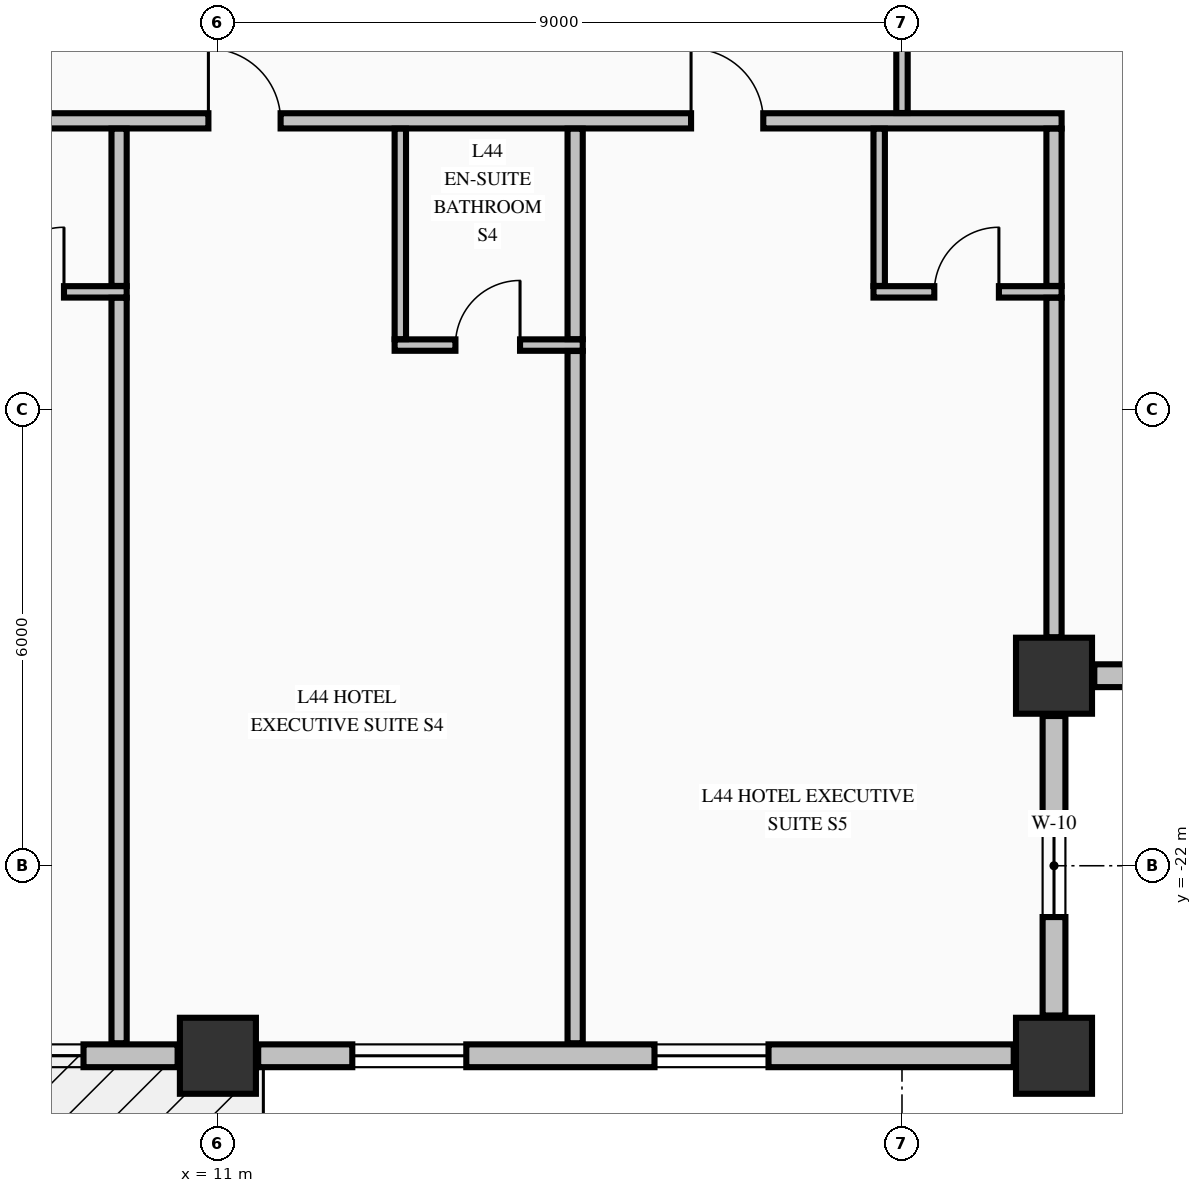
"""IFC4 building model, lengths in metres.
Left out: names, types, materials, properties, quantities, classifications, styles, units other than length and angle.
Written with IfcOpenShell. Run it as: python <this file> out.ifc"""

import sys

from ifc_helpers import new_model, si_unit, direction, frame, frame_2d, origin, origin_2d, place, context, subcontext, project, spatial, rectangle, extrude, element, fill, save


model = new_model("IFC4")
c1 = context("Model", 3, precision=1e-05, world=origin(), true_north=direction((0.0, 1.0)))
c2 = subcontext(c1, "Body", "Model", "MODEL_VIEW")
j1 = project(units=[si_unit("LENGTHUNIT", "METRE"), si_unit("PLANEANGLEUNIT", "RADIAN")], contexts=[c1])
p1 = place(None, origin())
s1 = spatial("IfcSite", under=j1, at=p1, CompositionType="ELEMENT")
p2 = place(p1, origin())
s2 = spatial("IfcBuilding", under=s1, at=p2, CompositionType="ELEMENT")
p3 = place(p2, frame((0.0, 0.0, 172.86)))
s3 = spatial("IfcBuildingStorey", under=s2, at=p3, CompositionType="ELEMENT", Elevation=172.86)
for number, where, z_axis, x_axis in (
    (1, (11.0, -24.5, -0.25), (0.0, 0.0, 1.0), (1.0, 0.0, 0.0)),
    (2, (22.0, -24.5, -0.25), (0.0, 0.0, 1.0), (1.0, 0.0, 0.0)),
    (3, (22.0, -19.5, -0.25), (0.0, 0.0, 1.0), (1.0, 0.0, 0.0)),
):
    element("IfcColumn", number, at=place(p3, frame(where, z_axis=z_axis, x_axis=x_axis)), inside=s3, PredefinedType="COLUMN", context=c2, shape_type="SweptSolid", body=[
        extrude(rectangle(XDim=1.0, YDim=1.0, at=origin_2d()), origin(), (0.0, 0.0, 1.0), 3.375),
    ])
p4 = place(p3, frame((22.0, -23.97, 0.0), z_axis=(0.0, 0.0, 1.0), x_axis=(0.0, 1.0, 0.0)))
e4 = element("IfcWall", 4, at=p4, inside=s3, PredefinedType="STANDARD", context=c2, shape_type="SweptSolid", body=[
    extrude(rectangle(XDim=3.94, YDim=0.3, at=frame_2d((1.97, 0.0))), origin(), (0.0, 0.0, 1.0), 2.517),
])
p5 = place(p4, frame((1.295, 0.0, 0.68)))
e5 = element("IfcOpeningElement", 5, at=p5, cuts=e4, PredefinedType="OPENING", context=c2, shape_type="SweptSolid", body=[
    extrude(rectangle(XDim=1.35, YDim=1.42, at=frame_2d((0.675, 0.71))), frame((0.0, 0.16, 0.0), z_axis=(0.0, -1.0, 0.0), x_axis=(1.0, 0.0, 0.0)), (0.0, 0.0, 1.0), 0.32),
])
p6 = place(p3, frame((22.53, -19.5, 0.0), z_axis=(0.0, 0.0, 1.0), x_axis=(1.0, 0.0, 0.0)))
e6 = element("IfcWall", 6, at=p6, inside=s3, PredefinedType="STANDARD", context=c2, shape_type="SweptSolid", body=[
    extrude(rectangle(XDim=3.94, YDim=0.3, at=frame_2d((1.97, 0.0))), origin(), (0.0, 0.0, 1.0), 2.517),
])
p7 = place(p6, frame((1.295, 0.0, 0.68)))
e7 = element("IfcOpeningElement", 7, at=p7, cuts=e6, PredefinedType="OPENING", context=c2, shape_type="SweptSolid", body=[
    extrude(rectangle(XDim=1.35, YDim=1.42, at=frame_2d((0.675, 0.71))), frame((0.0, 0.16, 0.0), z_axis=(0.0, -1.0, 0.0), x_axis=(1.0, 0.0, 0.0)), (0.0, 0.0, 1.0), 0.32),
])
p8 = place(p3, frame((0.53, -24.5, 0.0), z_axis=(0.0, 0.0, 1.0), x_axis=(1.0, 0.0, 0.0)))
e8 = element("IfcWall", 8, at=p8, inside=s3, PredefinedType="STANDARD", context=c2, shape_type="SweptSolid", body=[
    extrude(rectangle(XDim=9.94, YDim=0.3, at=frame_2d((4.97, 0.0))), origin(), (0.0, 0.0, 1.0), 2.517),
])
p9 = place(p8, frame((3.226, 0.0, 0.72)))
e9 = element("IfcOpeningElement", 9, at=p9, cuts=e8, PredefinedType="OPENING", context=c2, shape_type="SweptSolid", body=[
    extrude(rectangle(XDim=1.5, YDim=1.6, at=frame_2d((0.75, 0.8))), frame((0.0, 0.16, 0.0), z_axis=(0.0, -1.0, 0.0), x_axis=(1.0, 0.0, 0.0)), (0.0, 0.0, 1.0), 0.32),
])
p10 = place(p8, frame((5.214, 0.0, 0.72)))
e10 = element("IfcOpeningElement", 10, at=p10, cuts=e8, PredefinedType="OPENING", context=c2, shape_type="SweptSolid", body=[
    extrude(rectangle(XDim=1.5, YDim=1.6, at=frame_2d((0.75, 0.8))), frame((0.0, 0.16, 0.0), z_axis=(0.0, -1.0, 0.0), x_axis=(1.0, 0.0, 0.0)), (0.0, 0.0, 1.0), 0.32),
])
p11 = place(p8, frame((7.202, 0.0, 0.72)))
e11 = element("IfcOpeningElement", 11, at=p11, cuts=e8, PredefinedType="OPENING", context=c2, shape_type="SweptSolid", body=[
    extrude(rectangle(XDim=1.5, YDim=1.6, at=frame_2d((0.75, 0.8))), frame((0.0, 0.16, 0.0), z_axis=(0.0, -1.0, 0.0), x_axis=(1.0, 0.0, 0.0)), (0.0, 0.0, 1.0), 0.32),
])
p12 = place(p3, frame((11.53, -24.5, 0.0), z_axis=(0.0, 0.0, 1.0), x_axis=(1.0, 0.0, 0.0)))
e12 = element("IfcWall", 12, at=p12, inside=s3, PredefinedType="STANDARD", context=c2, shape_type="SweptSolid", body=[
    extrude(rectangle(XDim=9.94, YDim=0.3, at=frame_2d((4.97, 0.0))), origin(), (0.0, 0.0, 1.0), 2.517),
])
p13 = place(p12, frame((1.238, 0.0, 0.72)))
e13 = element("IfcOpeningElement", 13, at=p13, cuts=e12, PredefinedType="OPENING", context=c2, shape_type="SweptSolid", body=[
    extrude(rectangle(XDim=1.5, YDim=1.6, at=frame_2d((0.75, 0.8))), frame((0.0, 0.16, 0.0), z_axis=(0.0, -1.0, 0.0), x_axis=(1.0, 0.0, 0.0)), (0.0, 0.0, 1.0), 0.32),
])
p14 = place(p12, frame((5.214, 0.0, 0.72)))
e14 = element("IfcOpeningElement", 14, at=p14, cuts=e12, PredefinedType="OPENING", context=c2, shape_type="SweptSolid", body=[
    extrude(rectangle(XDim=1.5, YDim=1.6, at=frame_2d((0.75, 0.8))), frame((0.0, 0.16, 0.0), z_axis=(0.0, -1.0, 0.0), x_axis=(1.0, 0.0, 0.0)), (0.0, 0.0, 1.0), 0.32),
])
p15 = place(p3, frame((13.325, -15.15, 0.0), z_axis=(0.0, 0.0, 1.0), x_axis=(1.0, 0.0, 0.0)))
e15 = element("IfcWall", 15, at=p15, inside=s3, PredefinedType="PARTITIONING", context=c2, shape_type="SweptSolid", body=[
    extrude(rectangle(XDim=2.475, YDim=0.15, at=frame_2d((1.238, 0.0))), origin(), (0.0, 0.0, 1.0), 3.125),
])
p16 = place(p15, frame((0.8, 0.0, 0.0)))
e16 = element("IfcOpeningElement", 16, at=p16, cuts=e15, PredefinedType="OPENING", context=c2, shape_type="SweptSolid", body=[
    extrude(rectangle(XDim=0.85, YDim=2.1, at=frame_2d((0.425, 1.05))), frame((0.0, 0.085, 0.0), z_axis=(0.0, -1.0, 0.0), x_axis=(1.0, 0.0, 0.0)), (0.0, 0.0, 1.0), 0.17),
])
p17 = place(p3, frame((7.325, -14.45, 0.0), z_axis=(0.0, 0.0, 1.0), x_axis=(1.0, 0.0, 0.0)))
e17 = element("IfcWall", 17, at=p17, inside=s3, PredefinedType="PARTITIONING", context=c2, shape_type="SweptSolid", body=[
    extrude(rectangle(XDim=2.475, YDim=0.15, at=frame_2d((1.238, 0.0))), origin(), (0.0, 0.0, 1.0), 2.665),
])
p18 = place(p17, frame((0.8, 0.0, 0.0)))
e18 = element("IfcOpeningElement", 18, at=p18, cuts=e17, PredefinedType="OPENING", context=c2, shape_type="SweptSolid", body=[
    extrude(rectangle(XDim=0.85, YDim=2.1, at=frame_2d((0.425, 1.05))), frame((0.0, 0.085, 0.0), z_axis=(0.0, -1.0, 0.0), x_axis=(1.0, 0.0, 0.0)), (0.0, 0.0, 1.0), 0.17),
])
p19 = place(p3, frame((19.625, -14.45, 0.0), z_axis=(0.0, 0.0, 1.0), x_axis=(1.0, 0.0, 0.0)))
e19 = element("IfcWall", 19, at=p19, inside=s3, PredefinedType="PARTITIONING", context=c2, shape_type="SweptSolid", body=[
    extrude(rectangle(XDim=2.475, YDim=0.15, at=frame_2d((1.238, 0.0))), origin(), (0.0, 0.0, 1.0), 3.125),
])
p20 = place(p19, frame((0.8, 0.0, 0.0)))
e20 = element("IfcOpeningElement", 20, at=p20, cuts=e19, PredefinedType="OPENING", context=c2, shape_type="SweptSolid", body=[
    extrude(rectangle(XDim=0.85, YDim=2.1, at=frame_2d((0.425, 1.05))), frame((0.0, 0.085, 0.0), z_axis=(0.0, -1.0, 0.0), x_axis=(1.0, 0.0, 0.0)), (0.0, 0.0, 1.0), 0.17),
])
p21 = place(p3, frame((-17.1, -12.2, 0.0), z_axis=(0.0, 0.0, 1.0), x_axis=(1.0, 0.0, 0.0)))
e21 = element("IfcWall", 21, at=p21, inside=s3, PredefinedType="PARTITIONING", context=c2, shape_type="SweptSolid", body=[
    extrude(rectangle(XDim=39.2, YDim=0.2, at=frame_2d((19.6, 0.0))), origin(), (0.0, 0.0, 1.0), 3.125),
])
p22 = place(p21, frame((3.825, 0.0, 0.0)))
e22 = element("IfcOpeningElement", 22, at=p22, cuts=e21, PredefinedType="OPENING", context=c2, shape_type="SweptSolid", body=[
    extrude(rectangle(XDim=0.95, YDim=2.15, at=frame_2d((0.475, 1.075))), frame((0.0, 0.11, 0.0), z_axis=(0.0, -1.0, 0.0), x_axis=(1.0, 0.0, 0.0)), (0.0, 0.0, 1.0), 0.22),
])
p23 = place(p21, frame((13.775, 0.0, 0.0)))
e23 = element("IfcOpeningElement", 23, at=p23, cuts=e21, PredefinedType="OPENING", context=c2, shape_type="SweptSolid", body=[
    extrude(rectangle(XDim=0.95, YDim=2.15, at=frame_2d((0.475, 1.075))), frame((0.0, 0.11, 0.0), z_axis=(0.0, -1.0, 0.0), x_axis=(1.0, 0.0, 0.0)), (0.0, 0.0, 1.0), 0.22),
])
p24 = place(p21, frame((21.775, 0.0, 0.0)))
e24 = element("IfcOpeningElement", 24, at=p24, cuts=e21, PredefinedType="OPENING", context=c2, shape_type="SweptSolid", body=[
    extrude(rectangle(XDim=0.95, YDim=2.15, at=frame_2d((0.475, 1.075))), frame((0.0, 0.11, 0.0), z_axis=(0.0, -1.0, 0.0), x_axis=(1.0, 0.0, 0.0)), (0.0, 0.0, 1.0), 0.22),
])
p25 = place(p21, frame((27.975, 0.0, 0.0)))
e25 = element("IfcOpeningElement", 25, at=p25, cuts=e21, PredefinedType="OPENING", context=c2, shape_type="SweptSolid", body=[
    extrude(rectangle(XDim=0.95, YDim=2.15, at=frame_2d((0.475, 1.075))), frame((0.0, 0.11, 0.0), z_axis=(0.0, -1.0, 0.0), x_axis=(1.0, 0.0, 0.0)), (0.0, 0.0, 1.0), 0.22),
])
p26 = place(p21, frame((34.325, 0.0, 0.0)))
e26 = element("IfcOpeningElement", 26, at=p26, cuts=e21, PredefinedType="OPENING", context=c2, shape_type="SweptSolid", body=[
    extrude(rectangle(XDim=0.95, YDim=2.15, at=frame_2d((0.475, 1.075))), frame((0.0, 0.11, 0.0), z_axis=(0.0, -1.0, 0.0), x_axis=(1.0, 0.0, 0.0)), (0.0, 0.0, 1.0), 0.22),
])
p27 = place(p3, frame((9.7, -24.335, 0.0), z_axis=(0.0, 0.0, 1.0), x_axis=(0.0, 1.0, 0.0)))
e27 = element("IfcWall", 27, at=p27, inside=s3, PredefinedType="PARTITIONING", context=c2, shape_type="SweptSolid", body=[
    extrude(rectangle(XDim=9.807, YDim=0.2, at=frame_2d((4.903, 0.0))), origin(), (0.0, 0.0, 1.0), 3.125),
])
p28 = place(p3, frame((9.7, -14.372, 0.0), z_axis=(0.0, 0.0, 1.0), x_axis=(0.0, 1.0, 0.0)))
e28 = element("IfcWall", 28, at=p28, inside=s3, PredefinedType="PARTITIONING", context=c2, shape_type="SweptSolid", body=[
    extrude(rectangle(XDim=2.069, YDim=0.2, at=frame_2d((1.035, 0.0))), origin(), (0.0, 0.0, 1.0), 3.125),
])
p29 = place(p3, frame((13.4, -15.072, 0.0), z_axis=(0.0, 0.0, 1.0), x_axis=(0.0, 1.0, 0.0)))
e29 = element("IfcWall", 29, at=p29, inside=s3, PredefinedType="PARTITIONING", context=c2, shape_type="SweptSolid", body=[
    extrude(rectangle(XDim=2.769, YDim=0.15, at=frame_2d((1.385, 0.0))), origin(), (0.0, 0.0, 1.0), 3.125),
])
p30 = place(p3, frame((15.7, -24.335, 0.0), z_axis=(0.0, 0.0, 1.0), x_axis=(0.0, 1.0, 0.0)))
e30 = element("IfcWall", 30, at=p30, inside=s3, PredefinedType="PARTITIONING", context=c2, shape_type="SweptSolid", body=[
    extrude(rectangle(XDim=9.107, YDim=0.2, at=frame_2d((4.553, 0.0))), origin(), (0.0, 0.0, 1.0), 3.125),
])
p31 = place(p3, frame((15.7, -15.072, 0.0), z_axis=(0.0, 0.0, 1.0), x_axis=(0.0, 1.0, 0.0)))
e31 = element("IfcWall", 31, at=p31, inside=s3, PredefinedType="PARTITIONING", context=c2, shape_type="SweptSolid", body=[
    extrude(rectangle(XDim=2.769, YDim=0.2, at=frame_2d((1.385, 0.0))), origin(), (0.0, 0.0, 1.0), 3.125),
])
p32 = place(p3, frame((19.7, -14.372, 0.0), z_axis=(0.0, 0.0, 1.0), x_axis=(0.0, 1.0, 0.0)))
e32 = element("IfcWall", 32, at=p32, inside=s3, PredefinedType="PARTITIONING", context=c2, shape_type="SweptSolid", body=[
    extrude(rectangle(XDim=2.069, YDim=0.15, at=frame_2d((1.035, 0.0))), origin(), (0.0, 0.0, 1.0), 2.317),
])
p33 = place(p3, frame((20.0, -12.097, 0.0), z_axis=(0.0, 0.0, 1.0), x_axis=(0.0, 1.0, 0.0)))
e33 = element("IfcWall", 33, at=p33, inside=s3, PredefinedType="PARTITIONING", context=c2, shape_type="SweptSolid", body=[
    extrude(rectangle(XDim=1.716, YDim=0.15, at=frame_2d((0.858, 0.0))), origin(), (0.0, 0.0, 1.0), 2.317),
])
p34 = place(p3, frame((22.0, -18.994, 0.0), z_axis=(0.0, 0.0, 1.0), x_axis=(0.0, 1.0, 0.0)))
e34 = element("IfcWall", 34, at=p34, inside=s3, PredefinedType="PARTITIONING", context=c2, shape_type="SweptSolid", body=[
    extrude(rectangle(XDim=4.466, YDim=0.2, at=frame_2d((2.233, 0.0))), origin(), (0.0, 0.0, 1.0), 3.125),
])
p35 = place(p3, frame((22.0, -14.372, 0.0), z_axis=(0.0, 0.0, 1.0), x_axis=(0.0, 1.0, 0.0)))
e35 = element("IfcWall", 35, at=p35, inside=s3, PredefinedType="PARTITIONING", context=c2, shape_type="SweptSolid", body=[
    extrude(rectangle(XDim=2.069, YDim=0.2, at=frame_2d((1.035, 0.0))), origin(), (0.0, 0.0, 1.0), 3.125),
])
p36 = place(p5, origin())
e36 = element("IfcWindow", 36, at=p36, inside=s3, PartitioningType="SINGLE_PANEL", PredefinedType="WINDOW", context=c2, shape_type="SweptSolid", body=[
    extrude(rectangle(XDim=1.35, YDim=1.42, at=frame_2d((0.675, 0.71))), frame((0.0, 0.03, 0.0), z_axis=(0.0, -1.0, 0.0), x_axis=(1.0, 0.0, 0.0)), (0.0, 0.0, 1.0), 0.06),
])
fill(e5, e36)
p37 = place(p11, origin())
e37 = element("IfcWindow", 37, at=p37, inside=s3, PartitioningType="SINGLE_PANEL", PredefinedType="WINDOW", context=c2, shape_type="SweptSolid", body=[
    extrude(rectangle(XDim=1.5, YDim=1.6, at=frame_2d((0.75, 0.8))), frame((0.0, 0.03, 0.0), z_axis=(0.0, -1.0, 0.0), x_axis=(1.0, 0.0, 0.0)), (0.0, 0.0, 1.0), 0.06),
])
fill(e11, e37)
p38 = place(p13, origin())
e38 = element("IfcWindow", 38, at=p38, inside=s3, PartitioningType="SINGLE_PANEL", PredefinedType="WINDOW", context=c2, shape_type="SweptSolid", body=[
    extrude(rectangle(XDim=1.5, YDim=1.6, at=frame_2d((0.75, 0.8))), frame((0.0, 0.03, 0.0), z_axis=(0.0, -1.0, 0.0), x_axis=(1.0, 0.0, 0.0)), (0.0, 0.0, 1.0), 0.06),
])
fill(e13, e38)
p39 = place(p14, origin())
e39 = element("IfcWindow", 39, at=p39, inside=s3, PartitioningType="SINGLE_PANEL", PredefinedType="WINDOW", context=c2, shape_type="SweptSolid", body=[
    extrude(rectangle(XDim=1.5, YDim=1.6, at=frame_2d((0.75, 0.8))), frame((0.0, 0.03, 0.0), z_axis=(0.0, -1.0, 0.0), x_axis=(1.0, 0.0, 0.0)), (0.0, 0.0, 1.0), 0.06),
])
fill(e14, e39)
p40 = place(p18, origin())
e40 = element("IfcDoor", 40, at=p40, inside=s3, OperationType="SINGLE_SWING_RIGHT", PredefinedType="DOOR", context=c2, shape_type="SweptSolid", body=[
    extrude(rectangle(XDim=0.85, YDim=2.1, at=frame_2d((0.425, 1.05))), frame((0.0, 0.025, 0.0), z_axis=(0.0, -1.0, 0.0), x_axis=(1.0, 0.0, 0.0)), (0.0, 0.0, 1.0), 0.05),
])
fill(e18, e40)
p41 = place(p25, origin())
e41 = element("IfcDoor", 41, at=p41, inside=s3, OperationType="SINGLE_SWING_LEFT", PredefinedType="DOOR", context=c2, shape_type="SweptSolid", body=[
    extrude(rectangle(XDim=0.95, YDim=2.15, at=frame_2d((0.475, 1.075))), frame((0.0, 0.025, 0.0), z_axis=(0.0, -1.0, 0.0), x_axis=(1.0, 0.0, 0.0)), (0.0, 0.0, 1.0), 0.05),
])
fill(e25, e41)
p42 = place(p16, origin())
e42 = element("IfcDoor", 42, at=p42, inside=s3, OperationType="SINGLE_SWING_RIGHT", PredefinedType="DOOR", context=c2, shape_type="SweptSolid", body=[
    extrude(rectangle(XDim=0.85, YDim=2.1, at=frame_2d((0.425, 1.05))), frame((0.0, 0.025, 0.0), z_axis=(0.0, -1.0, 0.0), x_axis=(1.0, 0.0, 0.0)), (0.0, 0.0, 1.0), 0.05),
])
fill(e16, e42)
p43 = place(p26, origin())
e43 = element("IfcDoor", 43, at=p43, inside=s3, OperationType="SINGLE_SWING_LEFT", PredefinedType="DOOR", context=c2, shape_type="SweptSolid", body=[
    extrude(rectangle(XDim=0.95, YDim=2.15, at=frame_2d((0.475, 1.075))), frame((0.0, 0.025, 0.0), z_axis=(0.0, -1.0, 0.0), x_axis=(1.0, 0.0, 0.0)), (0.0, 0.0, 1.0), 0.05),
])
fill(e26, e43)
p44 = place(p20, origin())
e44 = element("IfcDoor", 44, at=p44, inside=s3, OperationType="SINGLE_SWING_RIGHT", PredefinedType="DOOR", context=c2, shape_type="SweptSolid", body=[
    extrude(rectangle(XDim=0.85, YDim=2.1, at=frame_2d((0.425, 1.05))), frame((0.0, 0.025, 0.0), z_axis=(0.0, -1.0, 0.0), x_axis=(1.0, 0.0, 0.0)), (0.0, 0.0, 1.0), 0.05),
])
fill(e20, e44)
save(model, sys.argv[1])
